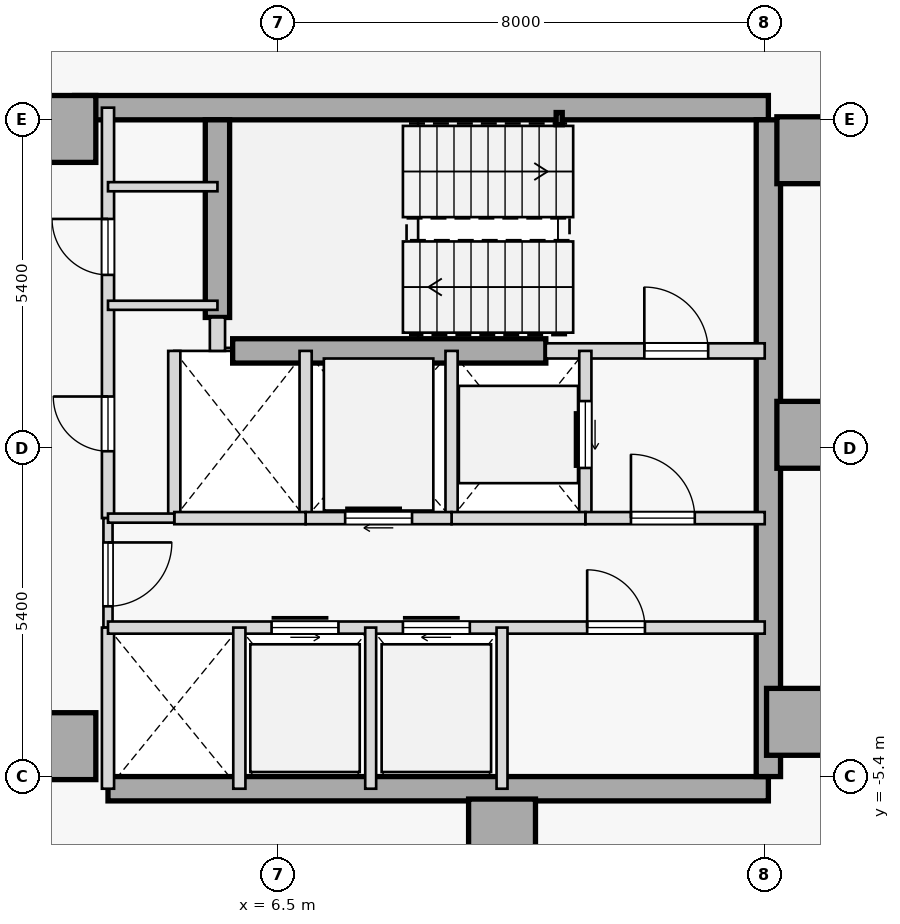
"""IFC4 building model, lengths in metres.
Left out: names, types, materials, properties, quantities, classifications, styles, units other than length and angle.
Written with IfcOpenShell. Run it as: python <this file> out.ifc"""

import sys

from ifc_helpers import new_model, si_unit, direction, frame, frame_2d, origin, origin_2d, place, context, subcontext, project, spatial, rectangle, hollow_rectangle, extrude, element, fill, save


model = new_model("IFC4")
c1 = context("Model", 3, precision=1e-05, world=origin(), true_north=direction((0.0, 1.0)))
c2 = subcontext(c1, "Body", "Model", "MODEL_VIEW")
j1 = project(units=[si_unit("LENGTHUNIT", "METRE"), si_unit("PLANEANGLEUNIT", "RADIAN")], contexts=[c1])
p1 = place(None, origin())
s1 = spatial("IfcSite", under=j1, at=p1, CompositionType="ELEMENT")
p2 = place(p1, origin())
s2 = spatial("IfcBuilding", under=s1, at=p2, CompositionType="ELEMENT")
p3 = place(p2, frame((0.0, 0.0, 91.1)))
s3 = spatial("IfcBuildingStorey", under=s2, at=p3, CompositionType="ELEMENT", Elevation=91.1)
for number, where, z_axis, x_axis in (
    (1, (15.25, 4.9, 0.0), (0.0, 0.0, 1.0), (1.0, 0.0, 0.0)),
    (2, (15.25, 0.22, 0.0), (0.0, 0.0, 1.0), (1.0, 0.0, 0.0)),
    (3, (15.08, -4.5, 0.0), (0.0, 0.0, 1.0), (1.0, 0.0, 0.0)),
    (4, (10.18, -6.32, 0.0), (0.0, 0.0, 1.0), (1.0, 0.0, 0.0)),
    (5, (2.95, -4.9, 0.0), (0.0, 0.0, 1.0), (1.0, 0.0, 0.0)),
    (6, (2.95, 5.25, 0.0), (0.0, 0.0, 1.0), (1.0, 0.0, 0.0)),
):
    element("IfcColumn", number, at=place(p3, frame(where, z_axis=z_axis, x_axis=x_axis)), inside=s3, PredefinedType="COLUMN", context=c2, shape_type="SweptSolid", body=[
        extrude(rectangle(XDim=1.1, YDim=1.1, at=origin_2d()), origin(), (0.0, 0.0, 1.0), 3.7),
    ])
p4 = place(p3, frame((3.15, 5.6, 0.0), z_axis=(0.0, 0.0, 1.0), x_axis=(1.0, 0.0, 0.0)))
e7 = element("IfcWall", 7, at=p4, inside=s3, PredefinedType="SHEAR", context=c2, shape_type="SweptSolid", body=[
    extrude(rectangle(XDim=11.41, YDim=0.4, at=frame_2d((5.705, 0.0))), origin(), (0.0, 0.0, 1.0), 3.475),
])
p5 = place(p3, frame((3.7, -5.6, 0.0), z_axis=(0.0, 0.0, 1.0), x_axis=(1.0, 0.0, 0.0)))
e8 = element("IfcWall", 8, at=p5, inside=s3, PredefinedType="SHEAR", context=c2, shape_type="SweptSolid", body=[
    extrude(rectangle(XDim=10.86, YDim=0.4, at=frame_2d((5.43, 0.0))), origin(), (0.0, 0.0, 1.0), 3.475),
])
p6 = place(p3, frame((14.56, -5.4, 0.0), z_axis=(0.0, 0.0, 1.0), x_axis=(0.0, 1.0, 0.0)))
e9 = element("IfcWall", 9, at=p6, inside=s3, PredefinedType="SHEAR", context=c2, shape_type="SweptSolid", body=[
    extrude(rectangle(XDim=10.8, YDim=0.4, at=frame_2d((5.4, 0.0))), origin(), (0.0, 0.0, 1.0), 3.475),
])
p7 = place(p3, frame((5.5, 2.15, 0.0), z_axis=(0.0, 0.0, 1.0), x_axis=(0.0, 1.0, 0.0)))
e10 = element("IfcWall", 10, at=p7, inside=s3, PredefinedType="SHEAR", context=c2, shape_type="SweptSolid", body=[
    extrude(rectangle(XDim=3.25, YDim=0.4, at=frame_2d((1.625, 0.0))), origin(), (0.0, 0.0, 1.0), 3.475),
])
p8 = place(p3, frame((5.75, 1.6, 0.0), z_axis=(0.0, 0.0, 1.0), x_axis=(1.0, 0.0, 0.0)))
e11 = element("IfcWall", 11, at=p8, inside=s3, PredefinedType="SHEAR", context=c2, shape_type="SweptSolid", body=[
    extrude(rectangle(XDim=5.15, YDim=0.4, at=frame_2d((2.575, 0.0))), origin(), (0.0, 0.0, 1.0), 3.475),
])
p9 = place(p3, frame((11.12, 5.42, 0.0), z_axis=(0.0, 0.0, 1.0), x_axis=(1.0, 0.0, 0.0)))
e12 = element("IfcColumn", 12, at=p9, inside=s3, PredefinedType="COLUMN", context=c2, shape_type="SweptSolid", body=[
    extrude(hollow_rectangle(XDim=0.1, YDim=0.2, WallThickness=0.008, at=origin_2d()), origin(), (0.0, 0.0, 1.0), 3.7),
])
p10 = place(p3, frame((10.9, 1.6, 0.0), z_axis=(0.0, 0.0, 1.0), x_axis=(1.0, 0.0, 0.0)))
e13 = element("IfcWall", 13, at=p10, inside=s3, PredefinedType="STANDARD", context=c2, shape_type="SweptSolid", body=[
    extrude(rectangle(XDim=3.6, YDim=0.25, at=frame_2d((1.8, 0.0))), origin(), (0.0, 0.0, 1.0), 3.475),
])
p11 = place(p10, frame((1.62, 0.0, 0.0)))
e14 = element("IfcOpeningElement", 14, at=p11, cuts=e13, PredefinedType="OPENING", context=c2, shape_type="SweptSolid", body=[
    extrude(rectangle(XDim=1.05, YDim=2.15, at=frame_2d((0.525, 1.075))), frame((0.0, 0.135, 0.0), z_axis=(0.0, -1.0, 0.0), x_axis=(1.0, 0.0, 0.0)), (0.0, 0.0, 1.0), 0.27),
])
p12 = place(p3, frame((5.5, 1.6, 0.0), z_axis=(0.0, 0.0, 1.0), x_axis=(0.0, 1.0, 0.0)))
e15 = element("IfcWall", 15, at=p12, inside=s3, PredefinedType="STANDARD", context=c2, shape_type="SweptSolid", body=[
    extrude(rectangle(XDim=0.55, YDim=0.25, at=frame_2d((0.275, 0.0))), origin(), (0.0, 0.0, 1.0), 3.475),
])
p13 = place(p3, frame((3.7, -1.15, 0.0), z_axis=(0.0, 0.0, 1.0), x_axis=(0.0, 1.0, 0.0)))
e16 = element("IfcWall", 16, at=p13, inside=s3, PredefinedType="STANDARD", context=c2, shape_type="SweptSolid", body=[
    extrude(rectangle(XDim=6.75, YDim=0.2, at=frame_2d((3.375, 0.0))), origin(), (0.0, 0.0, 1.0), 3.475),
])
p14 = place(p13, frame((1.1, 0.0, 0.0)))
e17 = element("IfcOpeningElement", 17, at=p14, cuts=e16, PredefinedType="OPENING", context=c2, shape_type="SweptSolid", body=[
    extrude(rectangle(XDim=0.9, YDim=2.15, at=frame_2d((0.45, 1.075))), frame((0.0, 0.11, 0.0), z_axis=(0.0, -1.0, 0.0), x_axis=(1.0, 0.0, 0.0)), (0.0, 0.0, 1.0), 0.22),
])
p15 = place(p13, frame((4.0, 0.0, 0.0)))
e18 = element("IfcOpeningElement", 18, at=p15, cuts=e16, PredefinedType="OPENING", context=c2, shape_type="SweptSolid", body=[
    extrude(rectangle(XDim=0.92, YDim=2.15, at=frame_2d((0.46, 1.075))), frame((0.0, 0.11, 0.0), z_axis=(0.0, -1.0, 0.0), x_axis=(1.0, 0.0, 0.0)), (0.0, 0.0, 1.0), 0.22),
])
p16 = place(p3, frame((3.7, -2.95, 0.0), z_axis=(0.0, 0.0, 1.0), x_axis=(0.0, 1.0, 0.0)))
e19 = element("IfcWall", 19, at=p16, inside=s3, PredefinedType="PARTITIONING", context=c2, shape_type="SweptSolid", body=[
    extrude(rectangle(XDim=1.8, YDim=0.15, at=frame_2d((0.9, 0.0))), origin(), (0.0, 0.0, 1.0), 3.475),
])
p17 = place(p16, frame((0.35, 0.0, 0.0)))
e20 = element("IfcOpeningElement", 20, at=p17, cuts=e19, PredefinedType="OPENING", context=c2, shape_type="SweptSolid", body=[
    extrude(rectangle(XDim=1.05, YDim=2.18, at=frame_2d((0.525, 1.09))), frame((0.0, 0.085, 0.0), z_axis=(0.0, -1.0, 0.0), x_axis=(1.0, 0.0, 0.0)), (0.0, 0.0, 1.0), 0.17),
])
p18 = place(p3, frame((3.7, -5.6, 0.0), z_axis=(0.0, 0.0, 1.0), x_axis=(0.0, 1.0, 0.0)))
e21 = element("IfcWall", 21, at=p18, inside=s3, PredefinedType="STANDARD", context=c2, shape_type="SweptSolid", body=[
    extrude(rectangle(XDim=2.65, YDim=0.2, at=frame_2d((1.325, 0.0))), origin(), (0.0, 0.0, 1.0), 3.475),
])
p19 = place(p3, frame((11.55, -1.15, 0.0), z_axis=(0.0, 0.0, 1.0), x_axis=(0.0, 1.0, 0.0)))
e22 = element("IfcWall", 22, at=p19, inside=s3, PredefinedType="STANDARD", context=c2, shape_type="SweptSolid", body=[
    extrude(rectangle(XDim=2.75, YDim=0.2, at=frame_2d((1.375, 0.0))), origin(), (0.0, 0.0, 1.0), 3.475),
])
p20 = place(p19, frame((0.825, 0.0, 0.0)))
e23 = element("IfcOpeningElement", 23, at=p20, cuts=e22, PredefinedType="OPENING", context=c2, shape_type="SweptSolid", body=[
    extrude(rectangle(XDim=1.1, YDim=2.15, at=frame_2d((0.55, 1.075))), frame((0.0, 0.11, 0.0), z_axis=(0.0, -1.0, 0.0), x_axis=(1.0, 0.0, 0.0)), (0.0, 0.0, 1.0), 0.22),
])
p21 = place(p3, frame((9.35, -1.15, 0.0), z_axis=(0.0, 0.0, 1.0), x_axis=(0.0, 1.0, 0.0)))
e24 = element("IfcWall", 24, at=p21, inside=s3, PredefinedType="STANDARD", context=c2, shape_type="SweptSolid", body=[
    extrude(rectangle(XDim=2.75, YDim=0.2, at=frame_2d((1.375, 0.0))), origin(), (0.0, 0.0, 1.0), 3.475),
])
p22 = place(p3, frame((11.55, -1.15, 0.0), z_axis=(0.0, 0.0, 1.0), x_axis=(1.0, 0.0, 0.0)))
e25 = element("IfcWall", 25, at=p22, inside=s3, PredefinedType="STANDARD", context=c2, shape_type="SweptSolid", body=[
    extrude(rectangle(XDim=2.95, YDim=0.2, at=frame_2d((1.475, 0.0))), origin(), (0.0, 0.0, 1.0), 3.475),
])
p23 = place(p22, frame((0.75, 0.0, 0.0)))
e26 = element("IfcOpeningElement", 26, at=p23, cuts=e25, PredefinedType="OPENING", context=c2, shape_type="SweptSolid", body=[
    extrude(rectangle(XDim=1.05, YDim=2.18, at=frame_2d((0.525, 1.09))), frame((0.0, 0.11, 0.0), z_axis=(0.0, -1.0, 0.0), x_axis=(1.0, 0.0, 0.0)), (0.0, 0.0, 1.0), 0.22),
])
p24 = place(p3, frame((9.35, -1.15, 0.0), z_axis=(0.0, 0.0, 1.0), x_axis=(1.0, 0.0, 0.0)))
e27 = element("IfcWall", 27, at=p24, inside=s3, PredefinedType="STANDARD", context=c2, shape_type="SweptSolid", body=[
    extrude(rectangle(XDim=2.2, YDim=0.2, at=frame_2d((1.1, 0.0))), origin(), (0.0, 0.0, 1.0), 3.475),
])
p25 = place(p3, frame((6.95, -1.15, 0.0), z_axis=(0.0, 0.0, 1.0), x_axis=(0.0, 1.0, 0.0)))
e28 = element("IfcWall", 28, at=p25, inside=s3, PredefinedType="STANDARD", context=c2, shape_type="SweptSolid", body=[
    extrude(rectangle(XDim=2.75, YDim=0.2, at=frame_2d((1.375, 0.0))), origin(), (0.0, 0.0, 1.0), 3.475),
])
p26 = place(p3, frame((6.95, -1.15, 0.0), z_axis=(0.0, 0.0, 1.0), x_axis=(1.0, 0.0, 0.0)))
e29 = element("IfcWall", 29, at=p26, inside=s3, PredefinedType="STANDARD", context=c2, shape_type="SweptSolid", body=[
    extrude(rectangle(XDim=2.4, YDim=0.2, at=frame_2d((1.2, 0.0))), origin(), (0.0, 0.0, 1.0), 3.475),
])
p27 = place(p26, frame((0.65, 0.0, 0.0)))
e30 = element("IfcOpeningElement", 30, at=p27, cuts=e29, PredefinedType="OPENING", context=c2, shape_type="SweptSolid", body=[
    extrude(rectangle(XDim=1.1, YDim=2.15, at=frame_2d((0.55, 1.075))), frame((0.0, 0.11, 0.0), z_axis=(0.0, -1.0, 0.0), x_axis=(1.0, 0.0, 0.0)), (0.0, 0.0, 1.0), 0.22),
])
p28 = place(p3, frame((4.79, -1.15, 0.0), z_axis=(0.0, 0.0, 1.0), x_axis=(0.0, 1.0, 0.0)))
e31 = element("IfcWall", 31, at=p28, inside=s3, PredefinedType="STANDARD", context=c2, shape_type="SweptSolid", body=[
    extrude(rectangle(XDim=2.75, YDim=0.2, at=frame_2d((1.375, 0.0))), origin(), (0.0, 0.0, 1.0), 3.475),
])
p29 = place(p3, frame((4.79, -1.15, 0.0), z_axis=(0.0, 0.0, 1.0), x_axis=(1.0, 0.0, 0.0)))
e32 = element("IfcWall", 32, at=p29, inside=s3, PredefinedType="STANDARD", context=c2, shape_type="SweptSolid", body=[
    extrude(rectangle(XDim=2.16, YDim=0.2, at=frame_2d((1.08, 0.0))), origin(), (0.0, 0.0, 1.0), 3.475),
])
p30 = place(p3, frame((3.7, -1.15, 0.0), z_axis=(0.0, 0.0, 1.0), x_axis=(1.0, 0.0, 0.0)))
e33 = element("IfcWall", 33, at=p30, inside=s3, PredefinedType="PARTITIONING", context=c2, shape_type="SweptSolid", body=[
    extrude(rectangle(XDim=1.09, YDim=0.15, at=frame_2d((0.545, 0.0))), origin(), (0.0, 0.0, 1.0), 3.475),
])
p31 = place(p3, frame((3.7, -2.95, 0.0), z_axis=(0.0, 0.0, 1.0), x_axis=(1.0, 0.0, 0.0)))
e34 = element("IfcWall", 34, at=p31, inside=s3, PredefinedType="STANDARD", context=c2, shape_type="SweptSolid", body=[
    extrude(rectangle(XDim=10.8, YDim=0.2, at=frame_2d((5.4, 0.0))), origin(), (0.0, 0.0, 1.0), 3.475),
])
p32 = place(p31, frame((2.69, 0.0, 0.0)))
e35 = element("IfcOpeningElement", 35, at=p32, cuts=e34, PredefinedType="OPENING", context=c2, shape_type="SweptSolid", body=[
    extrude(rectangle(XDim=1.1, YDim=2.15, at=frame_2d((0.55, 1.075))), frame((0.0, 0.11, 0.0), z_axis=(0.0, -1.0, 0.0), x_axis=(1.0, 0.0, 0.0)), (0.0, 0.0, 1.0), 0.22),
])
p33 = place(p31, frame((4.85, 0.0, 0.0)))
e36 = element("IfcOpeningElement", 36, at=p33, cuts=e34, PredefinedType="OPENING", context=c2, shape_type="SweptSolid", body=[
    extrude(rectangle(XDim=1.1, YDim=2.15, at=frame_2d((0.55, 1.075))), frame((0.0, 0.11, 0.0), z_axis=(0.0, -1.0, 0.0), x_axis=(1.0, 0.0, 0.0)), (0.0, 0.0, 1.0), 0.22),
])
p34 = place(p31, frame((7.88, 0.0, 0.0)))
e37 = element("IfcOpeningElement", 37, at=p34, cuts=e34, PredefinedType="OPENING", context=c2, shape_type="SweptSolid", body=[
    extrude(rectangle(XDim=0.95, YDim=2.15, at=frame_2d((0.475, 1.075))), frame((0.0, 0.11, 0.0), z_axis=(0.0, -1.0, 0.0), x_axis=(1.0, 0.0, 0.0)), (0.0, 0.0, 1.0), 0.22),
])
p35 = place(p3, frame((5.86, -5.6, 0.0), z_axis=(0.0, 0.0, 1.0), x_axis=(0.0, 1.0, 0.0)))
e38 = element("IfcWall", 38, at=p35, inside=s3, PredefinedType="STANDARD", context=c2, shape_type="SweptSolid", body=[
    extrude(rectangle(XDim=2.65, YDim=0.2, at=frame_2d((1.325, 0.0))), origin(), (0.0, 0.0, 1.0), 3.475),
])
for number, where, z_axis, x_axis in (
    (39, (10.18, -5.6, 0.0), (0.0, 0.0, 1.0), (0.0, 1.0, 0.0)),
    (40, (8.02, -5.6, 0.0), (0.0, 0.0, 1.0), (0.0, 1.0, 0.0)),
):
    element("IfcWall", number, at=place(p3, frame(where, z_axis=z_axis, x_axis=x_axis)), inside=s3, PredefinedType="STANDARD", context=c2, shape_type="SweptSolid", body=[
        extrude(rectangle(XDim=2.65, YDim=0.18, at=frame_2d((1.325, 0.0))), origin(), (0.0, 0.0, 1.0), 3.475),
    ])
for number, where, z_axis, x_axis in (
    (41, (3.7, 4.3, 0.0), (0.0, 0.0, 1.0), (1.0, 0.0, 0.0)),
    (42, (3.7, 2.35, 0.0), (0.0, 0.0, 1.0), (1.0, 0.0, 0.0)),
):
    element("IfcWall", number, at=place(p3, frame(where, z_axis=z_axis, x_axis=x_axis)), inside=s3, PredefinedType="PARTITIONING", context=c2, shape_type="SweptSolid", body=[
        extrude(rectangle(XDim=1.8, YDim=0.15, at=frame_2d((0.9, 0.0))), origin(), (0.0, 0.0, 1.0), 3.475),
    ])
p36 = place(p11, origin())
e43 = element("IfcDoor", 43, at=p36, inside=s3, OperationType="SINGLE_SWING_LEFT", PredefinedType="DOOR", context=c2, shape_type="SweptSolid", body=[
    extrude(rectangle(XDim=1.05, YDim=2.15, at=frame_2d((0.525, 1.075))), frame((0.0, 0.025, 0.0), z_axis=(0.0, -1.0, 0.0), x_axis=(1.0, 0.0, 0.0)), (0.0, 0.0, 1.0), 0.05),
])
fill(e14, e43)
p37 = place(p23, origin())
e44 = element("IfcDoor", 44, at=p37, inside=s3, OperationType="SINGLE_SWING_LEFT", PredefinedType="DOOR", context=c2, shape_type="SweptSolid", body=[
    extrude(rectangle(XDim=1.05, YDim=2.18, at=frame_2d((0.525, 1.09))), frame((0.0, 0.025, 0.0), z_axis=(0.0, -1.0, 0.0), x_axis=(1.0, 0.0, 0.0)), (0.0, 0.0, 1.0), 0.05),
])
fill(e26, e44)
p38 = place(p17, frame((1.05, 0.0, 0.0), z_axis=(0.0, 0.0, 1.0), x_axis=(-1.0, 0.0, 0.0)))
e45 = element("IfcDoor", 45, at=p38, inside=s3, OperationType="SINGLE_SWING_RIGHT", PredefinedType="DOOR", context=c2, shape_type="SweptSolid", body=[
    extrude(rectangle(XDim=1.05, YDim=2.18, at=frame_2d((0.525, 1.09))), frame((0.0, 0.025, 0.0), z_axis=(0.0, -1.0, 0.0), x_axis=(1.0, 0.0, 0.0)), (0.0, 0.0, 1.0), 0.05),
])
fill(e20, e45)
p39 = place(p20, origin())
e46 = element("IfcDoor", 46, at=p39, inside=s3, OperationType="SLIDING_TO_RIGHT", PredefinedType="DOOR", context=c2, shape_type="SweptSolid", body=[
    extrude(rectangle(XDim=1.1, YDim=2.15, at=frame_2d((0.55, 1.075))), frame((0.0, 0.025, 0.0), z_axis=(0.0, -1.0, 0.0), x_axis=(1.0, 0.0, 0.0)), (0.0, 0.0, 1.0), 0.05),
])
fill(e23, e46)
p40 = place(p27, origin())
e47 = element("IfcDoor", 47, at=p40, inside=s3, OperationType="SLIDING_TO_RIGHT", PredefinedType="DOOR", context=c2, shape_type="SweptSolid", body=[
    extrude(rectangle(XDim=1.1, YDim=2.15, at=frame_2d((0.55, 1.075))), frame((0.0, 0.025, 0.0), z_axis=(0.0, -1.0, 0.0), x_axis=(1.0, 0.0, 0.0)), (0.0, 0.0, 1.0), 0.05),
])
fill(e30, e47)
p41 = place(p32, origin())
e48 = element("IfcDoor", 48, at=p41, inside=s3, OperationType="SLIDING_TO_LEFT", PredefinedType="DOOR", context=c2, shape_type="SweptSolid", body=[
    extrude(rectangle(XDim=1.1, YDim=2.15, at=frame_2d((0.55, 1.075))), frame((0.0, 0.025, 0.0), z_axis=(0.0, -1.0, 0.0), x_axis=(1.0, 0.0, 0.0)), (0.0, 0.0, 1.0), 0.05),
])
fill(e35, e48)
p42 = place(p33, origin())
e49 = element("IfcDoor", 49, at=p42, inside=s3, OperationType="SLIDING_TO_RIGHT", PredefinedType="DOOR", context=c2, shape_type="SweptSolid", body=[
    extrude(rectangle(XDim=1.1, YDim=2.15, at=frame_2d((0.55, 1.075))), frame((0.0, 0.025, 0.0), z_axis=(0.0, -1.0, 0.0), x_axis=(1.0, 0.0, 0.0)), (0.0, 0.0, 1.0), 0.05),
])
fill(e36, e49)
p43 = place(p34, origin())
e50 = element("IfcDoor", 50, at=p43, inside=s3, OperationType="SINGLE_SWING_LEFT", PredefinedType="DOOR", context=c2, shape_type="SweptSolid", body=[
    extrude(rectangle(XDim=0.95, YDim=2.15, at=frame_2d((0.475, 1.075))), frame((0.0, 0.025, 0.0), z_axis=(0.0, -1.0, 0.0), x_axis=(1.0, 0.0, 0.0)), (0.0, 0.0, 1.0), 0.05),
])
fill(e37, e50)
p44 = place(p14, origin())
e51 = element("IfcDoor", 51, at=p44, inside=s3, OperationType="SINGLE_SWING_RIGHT", PredefinedType="DOOR", context=c2, shape_type="SweptSolid", body=[
    extrude(rectangle(XDim=0.9, YDim=2.15, at=frame_2d((0.45, 1.075))), frame((0.0, 0.025, 0.0), z_axis=(0.0, -1.0, 0.0), x_axis=(1.0, 0.0, 0.0)), (0.0, 0.0, 1.0), 0.05),
])
fill(e17, e51)
p45 = place(p15, origin())
e52 = element("IfcDoor", 52, at=p45, inside=s3, OperationType="SINGLE_SWING_RIGHT", PredefinedType="DOOR", context=c2, shape_type="SweptSolid", body=[
    extrude(rectangle(XDim=0.92, YDim=2.15, at=frame_2d((0.46, 1.075))), frame((0.0, 0.025, 0.0), z_axis=(0.0, -1.0, 0.0), x_axis=(1.0, 0.0, 0.0)), (0.0, 0.0, 1.0), 0.05),
])
fill(e18, e52)
save(model, sys.argv[1])
